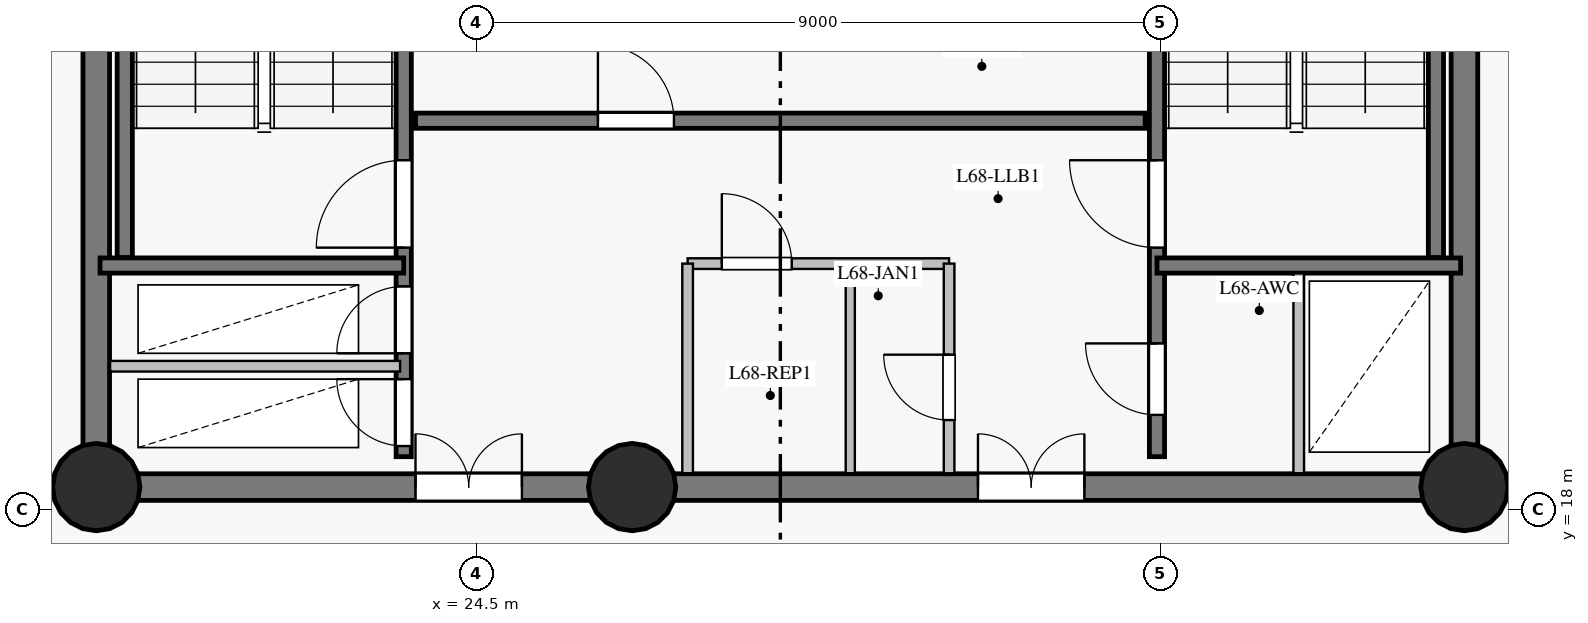
"""IFC4 building model, lengths in metres.
Left out: names, types, materials, properties, quantities, classifications, styles, units other than length and angle.
Written with IfcOpenShell. Run it as: python <this file> out.ifc"""

import sys

from ifc_helpers import new_model, si_unit, direction, frame, frame_2d, origin, origin_with_axes, origin_2d, place, context, subcontext, project, spatial, rectangle, circle, extrude, source, transform, mapped, element, fill, save


model = new_model("IFC4")
c1 = context("Model", 3, precision=1e-05, world=origin(), true_north=direction((0.0, 1.0)))
c2 = subcontext(c1, "Body", "Model", "MODEL_VIEW")
j1 = project(units=[si_unit("LENGTHUNIT", "METRE"), si_unit("PLANEANGLEUNIT", "RADIAN")], contexts=[c1])
p1 = place(None, origin())
s1 = spatial("IfcSite", under=j1, at=p1, CompositionType="ELEMENT")
p2 = place(p1, origin())
s2 = spatial("IfcBuilding", under=s1, at=p2, CompositionType="ELEMENT")
p3 = place(p2, frame((0.0, 0.0, 232.15)))
s3 = spatial("IfcBuildingStorey", under=s2, at=p3, CompositionType="ELEMENT", Elevation=232.15)
p4 = place(p3, frame((19.5, 18.3, 0.0), z_axis=(0.0, 0.0, 1.0), x_axis=(1.0, 0.0, 0.0)))
e1 = element("IfcWall", 1, at=p4, inside=s3, PredefinedType="SHEAR", context=c2, shape_type="SweptSolid", body=[
    extrude(rectangle(XDim=7.05, YDim=0.35, at=frame_2d((3.525, 0.0))), origin(), (0.0, 0.0, 1.0), 2.85),
])
p5 = place(p4, frame((4.2, 0.0, 0.0)))
e2 = element("IfcOpeningElement", 2, at=p5, cuts=e1, PredefinedType="OPENING", context=c2, shape_type="SweptSolid", body=[
    extrude(rectangle(XDim=1.4, YDim=2.2, at=frame_2d((0.7, 1.1))), frame((0.0, 0.185, 0.0), z_axis=(0.0, -1.0, 0.0), x_axis=(1.0, 0.0, 0.0)), (0.0, 0.0, 1.0), 0.37),
])
p6 = place(p3, frame((26.55, 18.3, 0.0), z_axis=(0.0, 0.0, 1.0), x_axis=(1.0, 0.0, 0.0)))
e3 = element("IfcWall", 3, at=p6, inside=s3, PredefinedType="SHEAR", context=c2, shape_type="SweptSolid", body=[
    extrude(rectangle(XDim=10.95, YDim=0.35, at=frame_2d((5.475, 0.0))), origin(), (0.0, 0.0, 1.0), 2.85),
])
p7 = place(p6, frame((4.55, 0.0, 0.0)))
e4 = element("IfcOpeningElement", 4, at=p7, cuts=e3, PredefinedType="OPENING", context=c2, shape_type="SweptSolid", body=[
    extrude(rectangle(XDim=1.4, YDim=2.2, at=frame_2d((0.7, 1.1))), frame((0.0, 0.185, 0.0), z_axis=(0.0, -1.0, 0.0), x_axis=(1.0, 0.0, 0.0)), (0.0, 0.0, 1.0), 0.37),
])
p8 = place(p3, frame((37.5, 18.3, 0.0), z_axis=(0.0, 0.0, 1.0), x_axis=(0.0, 1.0, 0.0)))
e5 = element("IfcWall", 5, at=p8, inside=s3, PredefinedType="SHEAR", context=c2, shape_type="SweptSolid", body=[
    extrude(rectangle(XDim=16.4, YDim=0.35, at=frame_2d((8.2, 0.0))), origin(), (0.0, 0.0, 1.0), 2.85),
])
p9 = place(p8, frame((13.85, 0.0, 0.0)))
e6 = element("IfcOpeningElement", 6, at=p9, cuts=e5, PredefinedType="OPENING", context=c2, shape_type="SweptSolid", body=[
    extrude(rectangle(XDim=1.2, YDim=2.15, at=frame_2d((0.6, 1.075))), frame((0.0, 0.185, 0.0), z_axis=(0.0, -1.0, 0.0), x_axis=(1.0, 0.0, 0.0)), (0.0, 0.0, 1.0), 0.37),
])
p10 = place(p3, frame((19.5, 34.7, 0.0), z_axis=(0.0, 0.0, 1.0), x_axis=(0.0, -1.0, 0.0)))
e7 = element("IfcWall", 7, at=p10, inside=s3, PredefinedType="SHEAR", context=c2, shape_type="SweptSolid", body=[
    extrude(rectangle(XDim=16.4, YDim=0.35, at=frame_2d((8.2, 0.0))), origin(), (0.0, 0.0, 1.0), 2.85),
])
p11 = place(p10, frame((3.24, 0.0, 0.0)))
e8 = element("IfcOpeningElement", 8, at=p11, cuts=e7, PredefinedType="OPENING", context=c2, shape_type="SweptSolid", body=[
    extrude(rectangle(XDim=1.1, YDim=2.15, at=frame_2d((0.55, 1.075))), frame((0.0, 0.185, 0.0), z_axis=(0.0, -1.0, 0.0), x_axis=(1.0, 0.0, 0.0)), (0.0, 0.0, 1.0), 0.37),
])
m1 = source(origin_with_axes(), c2, "Body", "SweptSolid", [
    extrude(circle(Radius=0.575, at=origin_2d()), origin(), (0.0, 0.0, 1.0), 3.05),
])
for number, where, z_axis, x_axis in (
    (9, (19.5, 18.3, 0.0), (0.0, 0.0, 1.0), (1.0, 0.0, 0.0)),
    (10, (26.55, 18.3, 0.0), (0.0, 0.0, 1.0), (1.0, 0.0, 0.0)),
    (11, (37.5, 18.3, 0.0), (0.0, 0.0, 1.0), (1.0, 0.0, 0.0)),
):
    element("IfcColumn", number, at=place(p3, frame(where, z_axis=z_axis, x_axis=x_axis)), inside=s3, PredefinedType="COLUMN", context=c2, shape_type="MappedRepresentation", body=[
        mapped(m1, transform((0.0, 0.0, 0.0), scale=1.0)),
    ])
p12 = place(p3, frame((34.218, 7.533, 0.0), z_axis=(0.0, 0.0, 1.0), x_axis=(0.674833312229, 0.737970189578, 0.0)))
e12 = element("IfcWall", 12, at=p12, inside=s3, PredefinedType="SOLIDWALL", context=c2, shape_type="SweptSolid", body=[
    extrude(rectangle(XDim=18.963, YDim=0.28, at=frame_2d((9.481, 0.0))), origin(), (0.0, 0.0, 1.0), 2.52),
])
p13 = place(p12, frame((5.091, 0.0, 0.85)))
e13 = element("IfcOpeningElement", 13, at=p13, cuts=e12, PredefinedType="OPENING", context=c2, shape_type="SweptSolid", body=[
    extrude(rectangle(XDim=0.95, YDim=1.5, at=frame_2d((0.475, 0.75))), frame((0.0, 0.15, 0.0), z_axis=(0.0, -1.0, 0.0), x_axis=(1.0, 0.0, 0.0)), (0.0, 0.0, 1.0), 0.3),
])
p14 = place(p12, frame((13.928, 0.0, 0.85)))
e14 = element("IfcOpeningElement", 14, at=p14, cuts=e12, PredefinedType="OPENING", context=c2, shape_type="SweptSolid", body=[
    extrude(rectangle(XDim=0.95, YDim=1.5, at=frame_2d((0.475, 0.75))), frame((0.0, 0.15, 0.0), z_axis=(0.0, -1.0, 0.0), x_axis=(1.0, 0.0, 0.0)), (0.0, 0.0, 1.0), 0.3),
])
p15 = place(p12, frame((3.426, 0.0, 0.0)))
e15 = element("IfcOpeningElement", 15, at=p15, cuts=e12, PredefinedType="OPENING", context=c2, shape_type="SweptSolid", body=[
    extrude(rectangle(XDim=1.05, YDim=2.12, at=frame_2d((0.525, 1.06))), frame((0.0, 0.15, 0.0), z_axis=(0.0, -1.0, 0.0), x_axis=(1.0, 0.0, 0.0)), (0.0, 0.0, 1.0), 0.3),
])
p16 = place(p3, frame((23.545, 18.7, 0.0), z_axis=(0.0, 0.0, 1.0), x_axis=(0.0, 1.0, 0.0)))
e16 = element("IfcWall", 16, at=p16, inside=s3, PredefinedType="SHEAR", context=c2, shape_type="SweptSolid", body=[
    extrude(rectangle(XDim=15.6, YDim=0.2, at=frame_2d((7.8, 0.0))), origin(), (0.0, 0.0, 1.0), 2.85),
])
p17 = place(p16, frame((2.75, 0.0, 0.0)))
e17 = element("IfcOpeningElement", 17, at=p17, cuts=e16, PredefinedType="OPENING", context=c2, shape_type="SweptSolid", body=[
    extrude(rectangle(XDim=1.15, YDim=2.15, at=frame_2d((0.575, 1.075))), frame((0.0, 0.11, 0.0), z_axis=(0.0, -1.0, 0.0), x_axis=(1.0, 0.0, 0.0)), (0.0, 0.0, 1.0), 0.22),
])
p18 = place(p16, frame((0.14, 0.0, 0.0)))
e18 = element("IfcOpeningElement", 18, at=p18, cuts=e16, PredefinedType="OPENING", context=c2, shape_type="SweptSolid", body=[
    extrude(rectangle(XDim=0.88, YDim=2.1, at=frame_2d((0.44, 1.05))), frame((0.0, 0.11, 0.0), z_axis=(0.0, -1.0, 0.0), x_axis=(1.0, 0.0, 0.0)), (0.0, 0.0, 1.0), 0.22),
])
p19 = place(p16, frame((1.36, 0.0, 0.0)))
e19 = element("IfcOpeningElement", 19, at=p19, cuts=e16, PredefinedType="OPENING", context=c2, shape_type="SweptSolid", body=[
    extrude(rectangle(XDim=0.88, YDim=2.1, at=frame_2d((0.44, 1.05))), frame((0.0, 0.11, 0.0), z_axis=(0.0, -1.0, 0.0), x_axis=(1.0, 0.0, 0.0)), (0.0, 0.0, 1.0), 0.22),
])
p20 = place(p16, frame((12.1, 0.0, 0.0)))
e20 = element("IfcOpeningElement", 20, at=p20, cuts=e16, PredefinedType="OPENING", context=c2, shape_type="SweptSolid", body=[
    extrude(rectangle(XDim=1.12, YDim=2.15, at=frame_2d((0.56, 1.075))), frame((0.0, 0.11, 0.0), z_axis=(0.0, -1.0, 0.0), x_axis=(1.0, 0.0, 0.0)), (0.0, 0.0, 1.0), 0.22),
])
p21 = place(p16, frame((14.05, 0.0, 0.0)))
e21 = element("IfcOpeningElement", 21, at=p21, cuts=e16, PredefinedType="OPENING", context=c2, shape_type="SweptSolid", body=[
    extrude(rectangle(XDim=1.12, YDim=2.15, at=frame_2d((0.56, 1.075))), frame((0.0, 0.11, 0.0), z_axis=(0.0, -1.0, 0.0), x_axis=(1.0, 0.0, 0.0)), (0.0, 0.0, 1.0), 0.22),
])
p22 = place(p3, frame((33.455, 18.7, 0.0), z_axis=(0.0, 0.0, 1.0), x_axis=(0.0, 1.0, 0.0)))
e22 = element("IfcWall", 22, at=p22, inside=s3, PredefinedType="SHEAR", context=c2, shape_type="SweptSolid", body=[
    extrude(rectangle(XDim=15.6, YDim=0.2, at=frame_2d((7.8, 0.0))), origin(), (0.0, 0.0, 1.0), 2.85),
])
p23 = place(p22, frame((2.75, 0.0, 0.0)))
e23 = element("IfcOpeningElement", 23, at=p23, cuts=e22, PredefinedType="OPENING", context=c2, shape_type="SweptSolid", body=[
    extrude(rectangle(XDim=1.15, YDim=2.15, at=frame_2d((0.575, 1.075))), frame((0.0, 0.11, 0.0), z_axis=(0.0, -1.0, 0.0), x_axis=(1.0, 0.0, 0.0)), (0.0, 0.0, 1.0), 0.22),
])
p24 = place(p22, frame((0.55, 0.0, 0.0)))
e24 = element("IfcOpeningElement", 24, at=p24, cuts=e22, PredefinedType="OPENING", context=c2, shape_type="SweptSolid", body=[
    extrude(rectangle(XDim=0.94, YDim=2.1, at=frame_2d((0.47, 1.05))), frame((0.0, 0.11, 0.0), z_axis=(0.0, -1.0, 0.0), x_axis=(1.0, 0.0, 0.0)), (0.0, 0.0, 1.0), 0.22),
])
p25 = place(p3, frame((23.7, 23.12, 0.0), z_axis=(0.0, 0.0, 1.0), x_axis=(1.0, 0.0, 0.0)))
e25 = element("IfcWall", 25, at=p25, inside=s3, PredefinedType="SHEAR", context=c2, shape_type="SweptSolid", body=[
    extrude(rectangle(XDim=9.6, YDim=0.2, at=frame_2d((4.8, 0.0))), origin(), (0.0, 0.0, 1.0), 2.85),
])
p26 = place(p25, frame((2.4, 0.0, 0.0)))
e26 = element("IfcOpeningElement", 26, at=p26, cuts=e25, PredefinedType="OPENING", context=c2, shape_type="SweptSolid", body=[
    extrude(rectangle(XDim=1.0, YDim=2.15, at=frame_2d((0.5, 1.075))), frame((0.0, 0.11, 0.0), z_axis=(0.0, -1.0, 0.0), x_axis=(1.0, 0.0, 0.0)), (0.0, 0.0, 1.0), 0.22),
])
for number, where, z_axis, x_axis in (
    (27, (19.875, 21.32, 0.0), (0.0, 0.0, 1.0), (0.0, 1.0, 0.0)),
    (28, (37.125, 21.32, 0.0), (0.0, 0.0, 1.0), (0.0, 1.0, 0.0)),
):
    element("IfcWall", number, at=place(p3, frame(where, z_axis=z_axis, x_axis=x_axis)), inside=s3, PredefinedType="SHEAR", context=c2, shape_type="SweptSolid", body=[
        extrude(rectangle(XDim=7.5, YDim=0.2, at=frame_2d((3.75, 0.0))), origin(), (0.0, 0.0, 1.0), 2.85),
    ])
for number, where, z_axis, x_axis in (
    (29, (33.455, 21.215, 0.0), (0.0, 0.0, 1.0), (1.0, 0.0, 0.0)),
    (30, (19.55, 21.215, 0.0), (0.0, 0.0, 1.0), (1.0, 0.0, 0.0)),
):
    element("IfcWall", number, at=place(p3, frame(where, z_axis=z_axis, x_axis=x_axis)), inside=s3, PredefinedType="SHEAR", context=c2, shape_type="SweptSolid", body=[
        extrude(rectangle(XDim=3.995, YDim=0.2, at=frame_2d((1.998, 0.0))), origin(), (0.0, 0.0, 1.0), 2.85),
    ])
p27 = place(p3, frame((19.682, 19.89, 0.0), z_axis=(0.0, 0.0, 1.0), x_axis=(1.0, 0.0, 0.0)))
e31 = element("IfcWall", 31, at=p27, inside=s3, PredefinedType="PARTITIONING", context=c2, shape_type="SweptSolid", body=[
    extrude(rectangle(XDim=3.815, YDim=0.14, at=frame_2d((1.908, 0.0))), origin(), (0.0, 0.0, 1.0), 2.85),
])
p28 = place(p3, frame((27.28, 21.24, 0.0), z_axis=(0.0, 0.0, 1.0), x_axis=(1.0, 0.0, 0.0)))
e32 = element("IfcWall", 32, at=p28, inside=s3, PredefinedType="PARTITIONING", context=c2, shape_type="SweptSolid", body=[
    extrude(rectangle(XDim=3.44, YDim=0.14, at=frame_2d((1.72, 0.0))), origin(), (0.0, 0.0, 1.0), 2.85),
])
p29 = place(p28, frame((0.45, 0.0, 0.0)))
e33 = element("IfcOpeningElement", 33, at=p29, cuts=e32, PredefinedType="OPENING", context=c2, shape_type="SweptSolid", body=[
    extrude(rectangle(XDim=0.92, YDim=2.1, at=frame_2d((0.46, 1.05))), frame((0.0, 0.08, 0.0), z_axis=(0.0, -1.0, 0.0), x_axis=(1.0, 0.0, 0.0)), (0.0, 0.0, 1.0), 0.16),
])
p30 = place(p3, frame((27.28, 18.482, 0.0), z_axis=(0.0, 0.0, 1.0), x_axis=(0.0, 1.0, 0.0)))
e34 = element("IfcWall", 34, at=p30, inside=s3, PredefinedType="PARTITIONING", context=c2, shape_type="SweptSolid", body=[
    extrude(rectangle(XDim=2.758, YDim=0.14, at=frame_2d((1.379, 0.0))), origin(), (0.0, 0.0, 1.0), 2.85),
])
p31 = place(p3, frame((30.72, 18.482, 0.0), z_axis=(0.0, 0.0, 1.0), x_axis=(0.0, 1.0, 0.0)))
e35 = element("IfcWall", 35, at=p31, inside=s3, PredefinedType="PARTITIONING", context=c2, shape_type="SweptSolid", body=[
    extrude(rectangle(XDim=2.758, YDim=0.14, at=frame_2d((1.379, 0.0))), origin(), (0.0, 0.0, 1.0), 2.85),
])
p32 = place(p31, frame((0.7, 0.0, 0.0)))
e36 = element("IfcOpeningElement", 36, at=p32, cuts=e35, PredefinedType="OPENING", context=c2, shape_type="SweptSolid", body=[
    extrude(rectangle(XDim=0.86, YDim=2.1, at=frame_2d((0.43, 1.05))), frame((0.0, 0.08, 0.0), z_axis=(0.0, -1.0, 0.0), x_axis=(1.0, 0.0, 0.0)), (0.0, 0.0, 1.0), 0.16),
])
p33 = place(p3, frame((29.42, 18.482, 0.0), z_axis=(0.0, 0.0, 1.0), x_axis=(0.0, 1.0, 0.0)))
e37 = element("IfcWall", 37, at=p33, inside=s3, PredefinedType="PARTITIONING", context=c2, shape_type="SweptSolid", body=[
    extrude(rectangle(XDim=2.687, YDim=0.12, at=frame_2d((1.344, 0.0))), origin(), (0.0, 0.0, 1.0), 2.85),
])
p34 = place(p3, frame((35.32, 18.482, 0.0), z_axis=(0.0, 0.0, 1.0), x_axis=(0.0, 1.0, 0.0)))
e38 = element("IfcWall", 38, at=p34, inside=s3, PredefinedType="PARTITIONING", context=c2, shape_type="SweptSolid", body=[
    extrude(rectangle(XDim=2.629, YDim=0.14, at=frame_2d((1.314, 0.0))), origin(), (0.0, 0.0, 1.0), 2.85),
])
m2 = source(origin_with_axes(), c2, "Body", "SweptSolid", [
    extrude(rectangle(XDim=1.15, YDim=2.15, at=frame_2d((0.575, 1.075))), frame((0.0, 0.025, 0.0), z_axis=(0.0, -1.0, 0.0), x_axis=(1.0, 0.0, 0.0)), (0.0, 0.0, 1.0), 0.05),
])
p35 = place(p17, origin())
e39 = element("IfcDoor", 39, at=p35, inside=s3, OperationType="SINGLE_SWING_LEFT", PredefinedType="DOOR", context=c2, shape_type="MappedRepresentation", body=[
    mapped(m2, transform((0.0, 0.0, 0.0), scale=1.0)),
])
fill(e17, e39)
p36 = place(p23, origin())
e40 = element("IfcDoor", 40, at=p36, inside=s3, OperationType="SINGLE_SWING_RIGHT", PredefinedType="DOOR", context=c2, shape_type="MappedRepresentation", body=[
    mapped(m2, transform((0.0, 0.0, 0.0), scale=1.0)),
])
fill(e23, e40)
m3 = source(origin_with_axes(), c2, "Body", "SweptSolid", [
    extrude(rectangle(XDim=0.88, YDim=2.1, at=frame_2d((0.44, 1.05))), frame((0.0, 0.025, 0.0), z_axis=(0.0, -1.0, 0.0), x_axis=(1.0, 0.0, 0.0)), (0.0, 0.0, 1.0), 0.05),
])
p37 = place(p18, origin())
e41 = element("IfcDoor", 41, at=p37, inside=s3, OperationType="SINGLE_SWING_RIGHT", PredefinedType="DOOR", context=c2, shape_type="MappedRepresentation", body=[
    mapped(m3, transform((0.0, 0.0, 0.0), scale=1.0)),
])
fill(e18, e41)
p38 = place(p19, origin())
e42 = element("IfcDoor", 42, at=p38, inside=s3, OperationType="SINGLE_SWING_LEFT", PredefinedType="DOOR", context=c2, shape_type="MappedRepresentation", body=[
    mapped(m3, transform((0.0, 0.0, 0.0), scale=1.0)),
])
fill(e19, e42)
m4 = source(origin_with_axes(), c2, "Body", "SweptSolid", [
    extrude(rectangle(XDim=1.4, YDim=2.2, at=frame_2d((0.7, 1.1))), frame((0.0, 0.025, 0.0), z_axis=(0.0, -1.0, 0.0), x_axis=(1.0, 0.0, 0.0)), (0.0, 0.0, 1.0), 0.05),
])
p39 = place(p5, origin())
e43 = element("IfcDoor", 43, at=p39, inside=s3, OperationType="DOUBLE_DOOR_SINGLE_SWING", PredefinedType="DOOR", context=c2, shape_type="MappedRepresentation", body=[
    mapped(m4, transform((0.0, 0.0, 0.0), scale=1.0)),
])
fill(e2, e43)
p40 = place(p7, origin())
e44 = element("IfcDoor", 44, at=p40, inside=s3, OperationType="DOUBLE_DOOR_SINGLE_SWING", PredefinedType="DOOR", context=c2, shape_type="MappedRepresentation", body=[
    mapped(m4, transform((0.0, 0.0, 0.0), scale=1.0)),
])
fill(e4, e44)
m5 = source(origin_with_axes(), c2, "Body", "SweptSolid", [
    extrude(rectangle(XDim=0.94, YDim=2.1, at=frame_2d((0.47, 1.05))), frame((0.0, 0.025, 0.0), z_axis=(0.0, -1.0, 0.0), x_axis=(1.0, 0.0, 0.0)), (0.0, 0.0, 1.0), 0.05),
])
p41 = place(p24, origin())
e45 = element("IfcDoor", 45, at=p41, inside=s3, OperationType="SINGLE_SWING_RIGHT", PredefinedType="DOOR", context=c2, shape_type="MappedRepresentation", body=[
    mapped(m5, transform((0.0, 0.0, 0.0), scale=1.0)),
])
fill(e24, e45)
m6 = source(origin_with_axes(), c2, "Body", "SweptSolid", [
    extrude(rectangle(XDim=0.92, YDim=2.1, at=frame_2d((0.46, 1.05))), frame((0.0, 0.025, 0.0), z_axis=(0.0, -1.0, 0.0), x_axis=(1.0, 0.0, 0.0)), (0.0, 0.0, 1.0), 0.05),
])
p42 = place(p29, origin())
e46 = element("IfcDoor", 46, at=p42, inside=s3, OperationType="SINGLE_SWING_LEFT", PredefinedType="DOOR", context=c2, shape_type="MappedRepresentation", body=[
    mapped(m6, transform((0.0, 0.0, 0.0), scale=1.0)),
])
fill(e33, e46)
m7 = source(origin_with_axes(), c2, "Body", "SweptSolid", [
    extrude(rectangle(XDim=0.86, YDim=2.1, at=frame_2d((0.43, 1.05))), frame((0.0, 0.025, 0.0), z_axis=(0.0, -1.0, 0.0), x_axis=(1.0, 0.0, 0.0)), (0.0, 0.0, 1.0), 0.05),
])
p43 = place(p32, origin())
e47 = element("IfcDoor", 47, at=p43, inside=s3, OperationType="SINGLE_SWING_RIGHT", PredefinedType="DOOR", context=c2, shape_type="MappedRepresentation", body=[
    mapped(m7, transform((0.0, 0.0, 0.0), scale=1.0)),
])
fill(e36, e47)
m8 = source(origin_with_axes(), c2, "Body", "SweptSolid", [
    extrude(rectangle(XDim=1.0, YDim=2.15, at=frame_2d((0.5, 1.075))), frame((0.0, 0.025, 0.0), z_axis=(0.0, -1.0, 0.0), x_axis=(1.0, 0.0, 0.0)), (0.0, 0.0, 1.0), 0.05),
])
p44 = place(p26, origin())
e48 = element("IfcDoor", 48, at=p44, inside=s3, OperationType="SINGLE_SWING_LEFT", PredefinedType="DOOR", context=c2, shape_type="MappedRepresentation", body=[
    mapped(m8, transform((0.0, 0.0, 0.0), scale=1.0)),
])
fill(e26, e48)
save(model, sys.argv[1])
